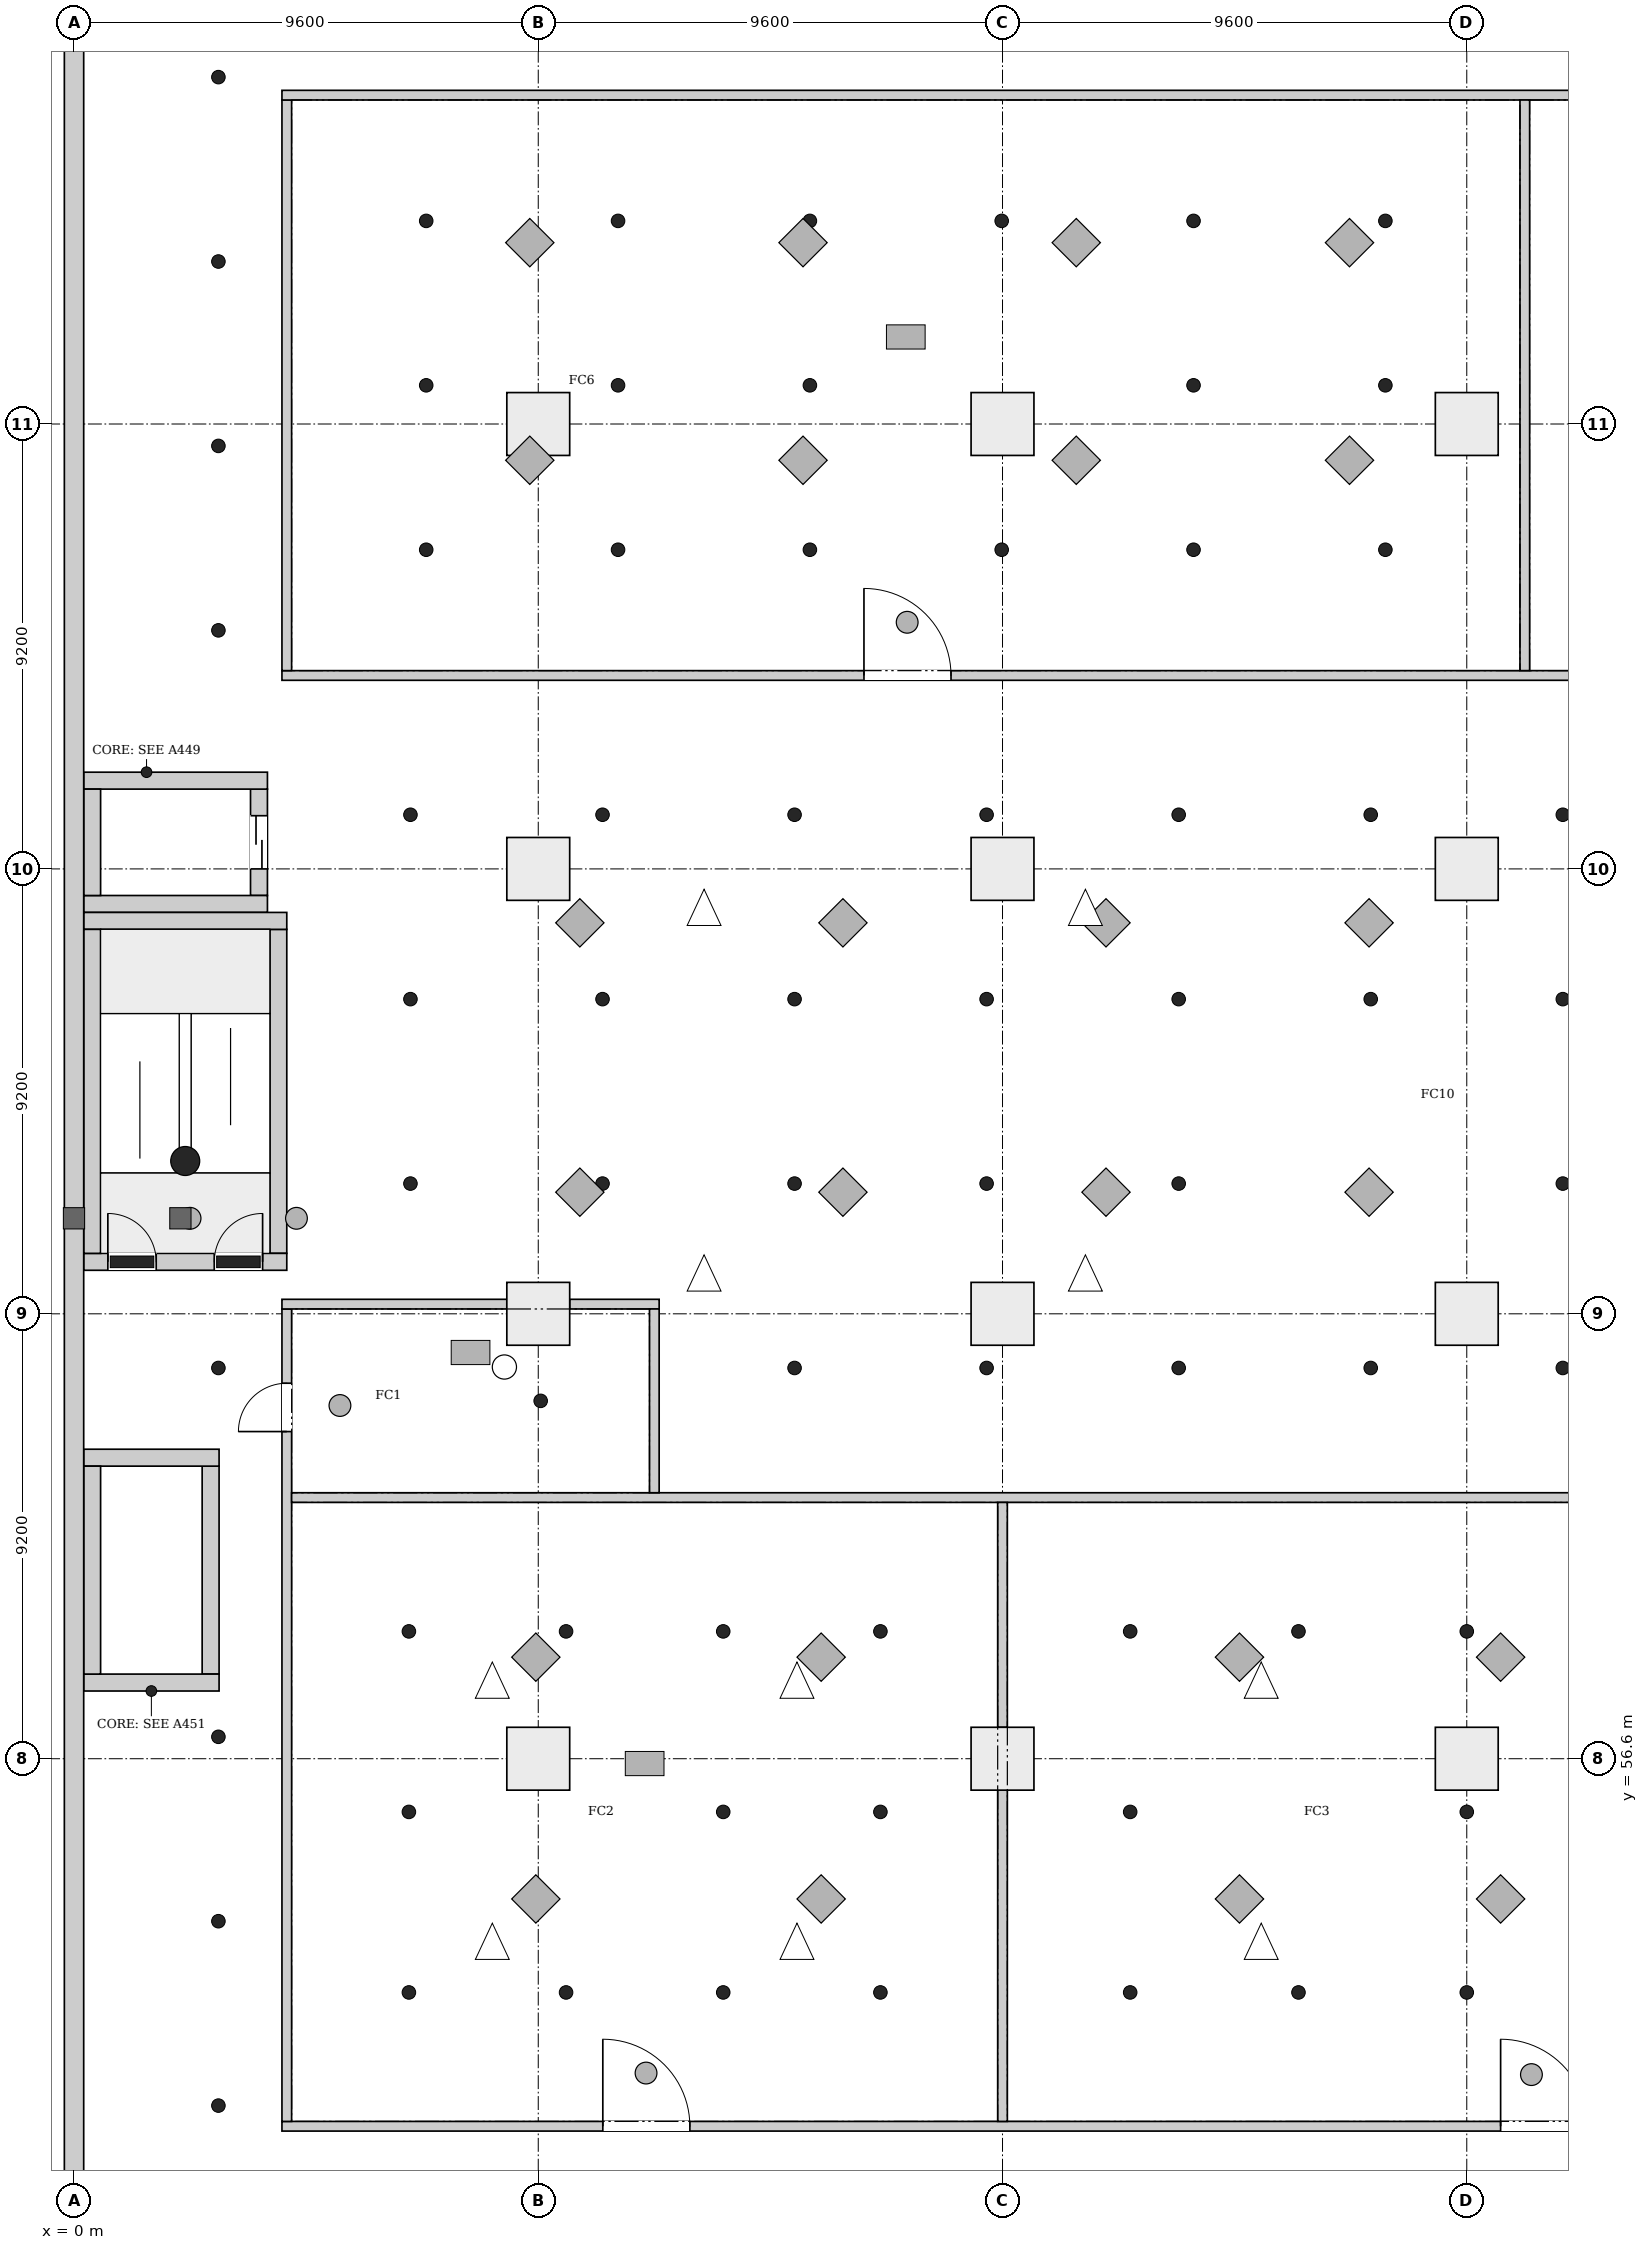
"""IFC4 building model, lengths in metres.
Left out: names, types, materials, properties, quantities, classifications, styles, units other than length and angle.
Written with IfcOpenShell. Run it as: python <this file> out.ifc"""

import sys

from ifc_helpers import new_model, si_unit, direction, frame, frame_2d, origin, origin_2d, place, context, subcontext, project, spatial, rectangle, extrude, element, fill, save


model = new_model("IFC4")
c1 = context("Model", 3, precision=1e-05, world=origin(), true_north=direction((0.0, 1.0)))
c2 = subcontext(c1, "Body", "Model", "MODEL_VIEW")
j1 = project(units=[si_unit("LENGTHUNIT", "METRE"), si_unit("PLANEANGLEUNIT", "RADIAN")], contexts=[c1])
p1 = place(None, origin())
s1 = spatial("IfcSite", under=j1, at=p1, CompositionType="ELEMENT")
p2 = place(p1, origin())
s2 = spatial("IfcBuilding", under=s1, at=p2, CompositionType="ELEMENT")
p3 = place(p2, frame((0.0, 0.0, 6.5)))
s3 = spatial("IfcBuildingStorey", under=s2, at=p3, CompositionType="ELEMENT", Elevation=6.5)
p4 = place(p3, frame((0.0, 46.72, 0.0), z_axis=(0.0, 0.0, 1.0), x_axis=(0.0, 1.0, 0.0)))
e1 = element("IfcWall", 1, at=p4, inside=s3, PredefinedType="SHEAR", context=c2, shape_type="SweptSolid", body=[
    extrude(rectangle(XDim=47.36, YDim=0.4, at=frame_2d((23.68, 0.0))), origin(), (0.0, 0.0, 1.0), 7.7),
])
p5 = place(p3, frame((0.2, 66.875, 0.0), z_axis=(0.0, 0.0, 1.0), x_axis=(1.0, 0.0, 0.0)))
e2 = element("IfcWall", 2, at=p5, inside=s3, PredefinedType="SHEAR", context=c2, shape_type="SweptSolid", body=[
    extrude(rectangle(XDim=4.2, YDim=0.35, at=frame_2d((2.1, 0.0))), origin(), (0.0, 0.0, 1.0), 7.7),
])
p6 = place(p5, frame((0.5, 0.0, 0.0)))
e3 = element("IfcOpeningElement", 3, at=p6, cuts=e2, PredefinedType="OPENING", context=c2, shape_type="SweptSolid", body=[
    extrude(rectangle(XDim=1.0, YDim=2.1, at=frame_2d((0.5, 1.05))), frame((0.0, 0.185, 0.0), z_axis=(0.0, -1.0, 0.0), x_axis=(1.0, 0.0, 0.0)), (0.0, 0.0, 1.0), 0.37),
])
p7 = place(p5, frame((2.7, 0.0, 0.0)))
e4 = element("IfcOpeningElement", 4, at=p7, cuts=e2, PredefinedType="OPENING", context=c2, shape_type="SweptSolid", body=[
    extrude(rectangle(XDim=1.0, YDim=2.1, at=frame_2d((0.5, 1.05))), frame((0.0, 0.185, 0.0), z_axis=(0.0, -1.0, 0.0), x_axis=(1.0, 0.0, 0.0)), (0.0, 0.0, 1.0), 0.37),
])
p8 = place(p3, frame((0.2, 73.925, 0.0), z_axis=(0.0, 0.0, 1.0), x_axis=(1.0, 0.0, 0.0)))
e5 = element("IfcWall", 5, at=p8, inside=s3, PredefinedType="SHEAR", context=c2, shape_type="SweptSolid", body=[
    extrude(rectangle(XDim=4.2, YDim=0.35, at=frame_2d((2.1, 0.0))), origin(), (0.0, 0.0, 1.0), 7.7),
])
for number, where, z_axis, x_axis in (
    (6, (0.375, 67.05, 0.0), (0.0, 0.0, 1.0), (0.0, 1.0, 0.0)),
    (7, (4.225, 67.05, 0.0), (0.0, 0.0, 1.0), (0.0, 1.0, 0.0)),
):
    element("IfcWall", number, at=place(p3, frame(where, z_axis=z_axis, x_axis=x_axis)), inside=s3, PredefinedType="SHEAR", context=c2, shape_type="SweptSolid", body=[
        extrude(rectangle(XDim=6.7, YDim=0.35, at=frame_2d((3.35, 0.0))), origin(), (0.0, 0.0, 1.0), 7.7),
    ])
for number, where, z_axis, x_axis in (
    (8, (0.2, 74.275, 0.0), (0.0, 0.0, 1.0), (1.0, 0.0, 0.0)),
    (9, (0.2, 76.825, 0.0), (0.0, 0.0, 1.0), (1.0, 0.0, 0.0)),
):
    element("IfcWall", number, at=place(p3, frame(where, z_axis=z_axis, x_axis=x_axis)), inside=s3, PredefinedType="SHEAR", context=c2, shape_type="SweptSolid", body=[
        extrude(rectangle(XDim=3.8, YDim=0.35, at=frame_2d((1.9, 0.0))), origin(), (0.0, 0.0, 1.0), 7.7),
    ])
p9 = place(p3, frame((0.375, 74.45, 0.0), z_axis=(0.0, 0.0, 1.0), x_axis=(0.0, 1.0, 0.0)))
e10 = element("IfcWall", 10, at=p9, inside=s3, PredefinedType="SHEAR", context=c2, shape_type="SweptSolid", body=[
    extrude(rectangle(XDim=2.2, YDim=0.35, at=frame_2d((1.1, 0.0))), origin(), (0.0, 0.0, 1.0), 7.7),
])
p10 = place(p3, frame((3.825, 74.45, 0.0), z_axis=(0.0, 0.0, 1.0), x_axis=(0.0, 1.0, 0.0)))
e11 = element("IfcWall", 11, at=p10, inside=s3, PredefinedType="SHEAR", context=c2, shape_type="SweptSolid", body=[
    extrude(rectangle(XDim=2.2, YDim=0.35, at=frame_2d((1.1, 0.0))), origin(), (0.0, 0.0, 1.0), 7.7),
])
p11 = place(p10, frame((0.55, 0.0, 0.0)))
e12 = element("IfcOpeningElement", 12, at=p11, cuts=e11, PredefinedType="OPENING", context=c2, shape_type="SweptSolid", body=[
    extrude(rectangle(XDim=1.1, YDim=2.1, at=frame_2d((0.55, 1.05))), frame((0.0, 0.185, 0.0), z_axis=(0.0, -1.0, 0.0), x_axis=(1.0, 0.0, 0.0)), (0.0, 0.0, 1.0), 0.37),
])
for number, where, z_axis, x_axis in (
    (13, (0.2, 58.175, 0.0), (0.0, 0.0, 1.0), (1.0, 0.0, 0.0)),
    (14, (0.2, 62.825, 0.0), (0.0, 0.0, 1.0), (1.0, 0.0, 0.0)),
):
    element("IfcWall", number, at=place(p3, frame(where, z_axis=z_axis, x_axis=x_axis)), inside=s3, PredefinedType="SHEAR", context=c2, shape_type="SweptSolid", body=[
        extrude(rectangle(XDim=2.8, YDim=0.35, at=frame_2d((1.4, 0.0))), origin(), (0.0, 0.0, 1.0), 7.7),
    ])
for number, where, z_axis, x_axis in (
    (15, (0.375, 58.35, 0.0), (0.0, 0.0, 1.0), (0.0, 1.0, 0.0)),
    (16, (2.825, 58.35, 0.0), (0.0, 0.0, 1.0), (0.0, 1.0, 0.0)),
):
    element("IfcWall", number, at=place(p3, frame(where, z_axis=z_axis, x_axis=x_axis)), inside=s3, PredefinedType="SHEAR", context=c2, shape_type="SweptSolid", body=[
        extrude(rectangle(XDim=4.3, YDim=0.35, at=frame_2d((2.15, 0.0))), origin(), (0.0, 0.0, 1.0), 7.7),
    ])
for number, where, z_axis, x_axis in (
    (17, (9.6, 56.6, 0.0), (0.0, 0.0, 1.0), (1.0, 0.0, 0.0)),
    (18, (19.2, 56.6, 0.0), (0.0, 0.0, 1.0), (1.0, 0.0, 0.0)),
    (19, (28.8, 56.6, 0.0), (0.0, 0.0, 1.0), (1.0, 0.0, 0.0)),
    (20, (9.6, 65.8, 0.0), (0.0, 0.0, 1.0), (1.0, 0.0, 0.0)),
    (21, (19.2, 65.8, 0.0), (0.0, 0.0, 1.0), (1.0, 0.0, 0.0)),
    (22, (28.8, 65.8, 0.0), (0.0, 0.0, 1.0), (1.0, 0.0, 0.0)),
    (23, (9.6, 75.0, 0.0), (0.0, 0.0, 1.0), (1.0, 0.0, 0.0)),
    (24, (19.2, 75.0, 0.0), (0.0, 0.0, 1.0), (1.0, 0.0, 0.0)),
    (25, (28.8, 75.0, 0.0), (0.0, 0.0, 1.0), (1.0, 0.0, 0.0)),
    (26, (9.6, 84.2, 0.0), (0.0, 0.0, 1.0), (1.0, 0.0, 0.0)),
    (27, (19.2, 84.2, 0.0), (0.0, 0.0, 1.0), (1.0, 0.0, 0.0)),
    (28, (28.8, 84.2, 0.0), (0.0, 0.0, 1.0), (1.0, 0.0, 0.0)),
):
    element("IfcColumn", number, at=place(p3, frame(where, z_axis=z_axis, x_axis=x_axis)), inside=s3, PredefinedType="COLUMN", context=c2, shape_type="SweptSolid", body=[
        extrude(rectangle(XDim=1.3, YDim=1.3, at=origin_2d()), origin(), (0.0, 0.0, 1.0), 7.7),
    ])
p12 = place(p3, frame((4.3, 49.0, 0.0), z_axis=(0.0, 0.0, 1.0), x_axis=(1.0, 0.0, 0.0)))
e29 = element("IfcWall", 29, at=p12, inside=s3, PredefinedType="PARTITIONING", context=c2, shape_type="SweptSolid", body=[
    extrude(rectangle(XDim=49.0, YDim=0.2, at=frame_2d((24.5, 0.0))), origin(), (0.0, 0.0, 1.0), 5.1),
])
p13 = place(p12, frame((6.635, 0.0, 0.0)))
e30 = element("IfcOpeningElement", 30, at=p13, cuts=e29, PredefinedType="OPENING", context=c2, shape_type="SweptSolid", body=[
    extrude(rectangle(XDim=1.8, YDim=2.1, at=frame_2d((0.9, 1.05))), frame((0.0, 0.11, 0.0), z_axis=(0.0, -1.0, 0.0), x_axis=(1.0, 0.0, 0.0)), (0.0, 0.0, 1.0), 0.22),
])
p14 = place(p12, frame((25.2, 0.0, 0.0)))
e31 = element("IfcOpeningElement", 31, at=p14, cuts=e29, PredefinedType="OPENING", context=c2, shape_type="SweptSolid", body=[
    extrude(rectangle(XDim=1.8, YDim=2.1, at=frame_2d((0.9, 1.05))), frame((0.0, 0.11, 0.0), z_axis=(0.0, -1.0, 0.0), x_axis=(1.0, 0.0, 0.0)), (0.0, 0.0, 1.0), 0.22),
])
p15 = place(p12, frame((40.565, 0.0, 0.0)))
e32 = element("IfcOpeningElement", 32, at=p15, cuts=e29, PredefinedType="OPENING", context=c2, shape_type="SweptSolid", body=[
    extrude(rectangle(XDim=1.8, YDim=2.1, at=frame_2d((0.9, 1.05))), frame((0.0, 0.11, 0.0), z_axis=(0.0, -1.0, 0.0), x_axis=(1.0, 0.0, 0.0)), (0.0, 0.0, 1.0), 0.22),
])
p16 = place(p3, frame((4.4, 49.1, 0.0), z_axis=(0.0, 0.0, 1.0), x_axis=(0.0, 1.0, 0.0)))
e33 = element("IfcWall", 33, at=p16, inside=s3, PredefinedType="PARTITIONING", context=c2, shape_type="SweptSolid", body=[
    extrude(rectangle(XDim=16.8, YDim=0.2, at=frame_2d((8.4, 0.0))), origin(), (0.0, 0.0, 1.0), 7.35),
])
p17 = place(p16, frame((14.265, 0.0, 0.0)))
e34 = element("IfcOpeningElement", 34, at=p17, cuts=e33, PredefinedType="OPENING", context=c2, shape_type="SweptSolid", body=[
    extrude(rectangle(XDim=1.0, YDim=2.1, at=frame_2d((0.5, 1.05))), frame((0.0, 0.11, 0.0), z_axis=(0.0, -1.0, 0.0), x_axis=(1.0, 0.0, 0.0)), (0.0, 0.0, 1.0), 0.22),
])
p18 = place(p3, frame((4.3, 66.0, 0.0), z_axis=(0.0, 0.0, 1.0), x_axis=(1.0, 0.0, 0.0)))
e35 = element("IfcWall", 35, at=p18, inside=s3, PredefinedType="PARTITIONING", context=c2, shape_type="SweptSolid", body=[
    extrude(rectangle(XDim=4.65, YDim=0.2, at=frame_2d((2.325, 0.0))), origin(), (0.0, 0.0, 1.0), 5.1),
])
p19 = place(p3, frame((4.3, 79.0, 0.0), z_axis=(0.0, 0.0, 1.0), x_axis=(1.0, 0.0, 0.0)))
e36 = element("IfcWall", 36, at=p19, inside=s3, PredefinedType="PARTITIONING", context=c2, shape_type="SweptSolid", body=[
    extrude(rectangle(XDim=49.0, YDim=0.2, at=frame_2d((24.5, 0.0))), origin(), (0.0, 0.0, 1.0), 5.1),
])
p20 = place(p19, frame((12.035, 0.0, 0.0)))
e37 = element("IfcOpeningElement", 37, at=p20, cuts=e36, PredefinedType="OPENING", context=c2, shape_type="SweptSolid", body=[
    extrude(rectangle(XDim=1.8, YDim=2.1, at=frame_2d((0.9, 1.05))), frame((0.0, 0.11, 0.0), z_axis=(0.0, -1.0, 0.0), x_axis=(1.0, 0.0, 0.0)), (0.0, 0.0, 1.0), 0.22),
])
p21 = place(p19, frame((36.365, 0.0, 0.0)))
e38 = element("IfcOpeningElement", 38, at=p21, cuts=e36, PredefinedType="OPENING", context=c2, shape_type="SweptSolid", body=[
    extrude(rectangle(XDim=1.8, YDim=2.1, at=frame_2d((0.9, 1.05))), frame((0.0, 0.11, 0.0), z_axis=(0.0, -1.0, 0.0), x_axis=(1.0, 0.0, 0.0)), (0.0, 0.0, 1.0), 0.22),
])
p22 = place(p3, frame((4.4, 79.1, 0.0), z_axis=(0.0, 0.0, 1.0), x_axis=(0.0, 1.0, 0.0)))
e39 = element("IfcWall", 39, at=p22, inside=s3, PredefinedType="PARTITIONING", context=c2, shape_type="SweptSolid", body=[
    extrude(rectangle(XDim=11.8, YDim=0.2, at=frame_2d((5.9, 0.0))), origin(), (0.0, 0.0, 1.0), 7.35),
])
p23 = place(p3, frame((4.3, 91.0, 0.0), z_axis=(0.0, 0.0, 1.0), x_axis=(1.0, 0.0, 0.0)))
e40 = element("IfcWall", 40, at=p23, inside=s3, PredefinedType="PARTITIONING", context=c2, shape_type="SweptSolid", body=[
    extrude(rectangle(XDim=49.0, YDim=0.2, at=frame_2d((24.5, 0.0))), origin(), (0.0, 0.0, 1.0), 5.1),
])
p24 = place(p3, frame((4.5, 62.0, 0.0), z_axis=(0.0, 0.0, 1.0), x_axis=(1.0, 0.0, 0.0)))
e41 = element("IfcWall", 41, at=p24, inside=s3, PredefinedType="PARTITIONING", context=c2, shape_type="SweptSolid", body=[
    extrude(rectangle(XDim=48.6, YDim=0.2, at=frame_2d((24.3, 0.0))), origin(), (0.0, 0.0, 1.0), 5.1),
])
p25 = place(p3, frame((10.25, 66.0, 0.0), z_axis=(0.0, 0.0, 1.0), x_axis=(1.0, 0.0, 0.0)))
e42 = element("IfcWall", 42, at=p25, inside=s3, PredefinedType="PARTITIONING", context=c2, shape_type="SweptSolid", body=[
    extrude(rectangle(XDim=1.85, YDim=0.2, at=frame_2d((0.925, 0.0))), origin(), (0.0, 0.0, 1.0), 4.7),
])
p26 = place(p3, frame((12.0, 62.1, 0.0), z_axis=(0.0, 0.0, 1.0), x_axis=(0.0, 1.0, 0.0)))
e43 = element("IfcWall", 43, at=p26, inside=s3, PredefinedType="PARTITIONING", context=c2, shape_type="SweptSolid", body=[
    extrude(rectangle(XDim=3.8, YDim=0.2, at=frame_2d((1.9, 0.0))), origin(), (0.0, 0.0, 1.0), 5.1),
])
p27 = place(p3, frame((19.2, 49.1, 0.0), z_axis=(0.0, 0.0, 1.0), x_axis=(0.0, 1.0, 0.0)))
e44 = element("IfcWall", 44, at=p27, inside=s3, PredefinedType="PARTITIONING", context=c2, shape_type="SweptSolid", body=[
    extrude(rectangle(XDim=6.85, YDim=0.2, at=frame_2d((3.425, 0.0))), origin(), (0.0, 0.0, 1.0), 4.7),
])
p28 = place(p3, frame((19.2, 57.25, 0.0), z_axis=(0.0, 0.0, 1.0), x_axis=(0.0, 1.0, 0.0)))
e45 = element("IfcWall", 45, at=p28, inside=s3, PredefinedType="PARTITIONING", context=c2, shape_type="SweptSolid", body=[
    extrude(rectangle(XDim=4.65, YDim=0.2, at=frame_2d((2.325, 0.0))), origin(), (0.0, 0.0, 1.0), 4.7),
])
p29 = place(p3, frame((30.0, 79.1, 0.0), z_axis=(0.0, 0.0, 1.0), x_axis=(0.0, 1.0, 0.0)))
e46 = element("IfcWall", 46, at=p29, inside=s3, PredefinedType="PARTITIONING", context=c2, shape_type="SweptSolid", body=[
    extrude(rectangle(XDim=11.8, YDim=0.2, at=frame_2d((5.9, 0.0))), origin(), (0.0, 0.0, 1.0), 5.1),
])
p30 = place(p6, origin())
e47 = element("IfcDoor", 47, at=p30, inside=s3, OperationType="SINGLE_SWING_RIGHT", PredefinedType="DOOR", context=c2, shape_type="SweptSolid", body=[
    extrude(rectangle(XDim=1.0, YDim=2.1, at=frame_2d((0.5, 1.05))), frame((0.0, 0.025, 0.0), z_axis=(0.0, -1.0, 0.0), x_axis=(1.0, 0.0, 0.0)), (0.0, 0.0, 1.0), 0.05),
])
fill(e3, e47)
p31 = place(p7, origin())
e48 = element("IfcDoor", 48, at=p31, inside=s3, OperationType="SINGLE_SWING_LEFT", PredefinedType="DOOR", context=c2, shape_type="SweptSolid", body=[
    extrude(rectangle(XDim=1.0, YDim=2.1, at=frame_2d((0.5, 1.05))), frame((0.0, 0.025, 0.0), z_axis=(0.0, -1.0, 0.0), x_axis=(1.0, 0.0, 0.0)), (0.0, 0.0, 1.0), 0.05),
])
fill(e4, e48)
p32 = place(p11, origin())
e49 = element("IfcDoor", 49, at=p32, inside=s3, OperationType="DOUBLE_DOOR_SLIDING", PredefinedType="DOOR", context=c2, shape_type="SweptSolid", body=[
    extrude(rectangle(XDim=1.1, YDim=2.1, at=frame_2d((0.55, 1.05))), frame((0.0, 0.025, 0.0), z_axis=(0.0, -1.0, 0.0), x_axis=(1.0, 0.0, 0.0)), (0.0, 0.0, 1.0), 0.05),
])
fill(e12, e49)
p33 = place(p13, origin())
e50 = element("IfcDoor", 50, at=p33, inside=s3, OperationType="DOUBLE_DOOR_SINGLE_SWING", PredefinedType="DOOR", context=c2, shape_type="SweptSolid", body=[
    extrude(rectangle(XDim=1.8, YDim=2.1, at=frame_2d((0.9, 1.05))), frame((0.0, 0.025, 0.0), z_axis=(0.0, -1.0, 0.0), x_axis=(1.0, 0.0, 0.0)), (0.0, 0.0, 1.0), 0.05),
])
fill(e30, e50)
p34 = place(p14, origin())
e51 = element("IfcDoor", 51, at=p34, inside=s3, OperationType="DOUBLE_DOOR_SINGLE_SWING", PredefinedType="DOOR", context=c2, shape_type="SweptSolid", body=[
    extrude(rectangle(XDim=1.8, YDim=2.1, at=frame_2d((0.9, 1.05))), frame((0.0, 0.025, 0.0), z_axis=(0.0, -1.0, 0.0), x_axis=(1.0, 0.0, 0.0)), (0.0, 0.0, 1.0), 0.05),
])
fill(e31, e51)
p35 = place(p20, origin())
e52 = element("IfcDoor", 52, at=p35, inside=s3, OperationType="DOUBLE_DOOR_SINGLE_SWING", PredefinedType="DOOR", context=c2, shape_type="SweptSolid", body=[
    extrude(rectangle(XDim=1.8, YDim=2.1, at=frame_2d((0.9, 1.05))), frame((0.0, 0.025, 0.0), z_axis=(0.0, -1.0, 0.0), x_axis=(1.0, 0.0, 0.0)), (0.0, 0.0, 1.0), 0.05),
])
fill(e37, e52)
p36 = place(p17, origin())
e53 = element("IfcDoor", 53, at=p36, inside=s3, OperationType="SINGLE_SWING_RIGHT", PredefinedType="DOOR", context=c2, shape_type="SweptSolid", body=[
    extrude(rectangle(XDim=1.0, YDim=2.1, at=frame_2d((0.5, 1.05))), frame((0.0, 0.025, 0.0), z_axis=(0.0, -1.0, 0.0), x_axis=(1.0, 0.0, 0.0)), (0.0, 0.0, 1.0), 0.05),
])
fill(e34, e53)
save(model, sys.argv[1])
